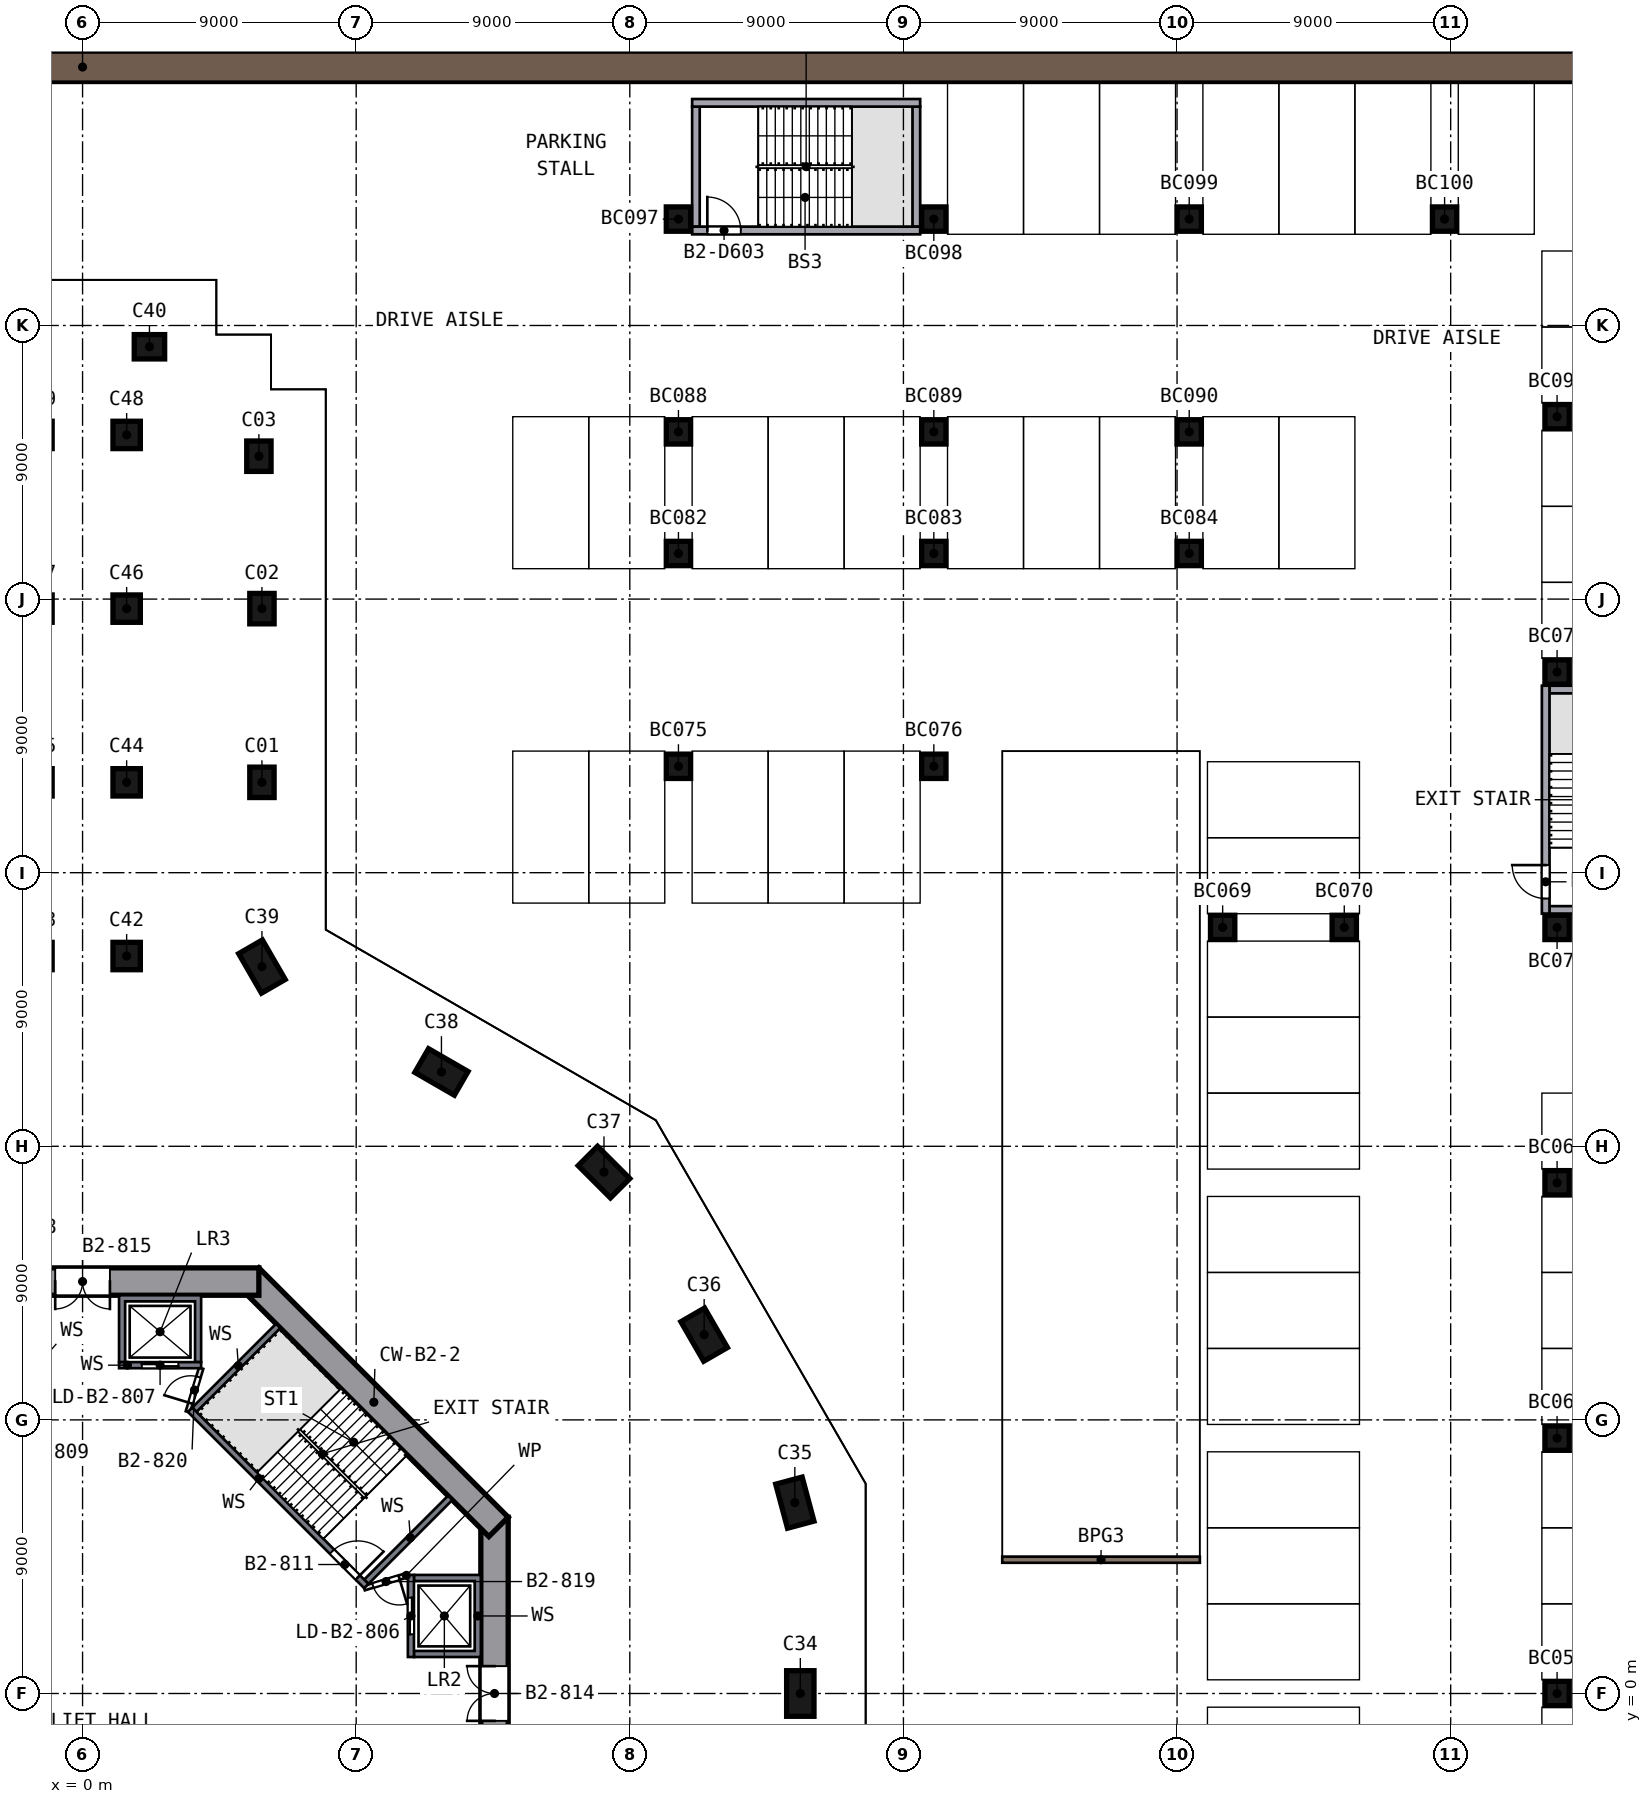
"""IFC4 building model, lengths in metres.
Left out: names, types, materials, properties, quantities, classifications, styles, units other than length and angle.
Written with IfcOpenShell. Run it as: python <this file> out.ifc"""

import sys

from ifc_helpers import new_model, si_unit, direction, frame, frame_2d, origin, origin_2d, place, context, subcontext, project, spatial, polyline, rectangle, outline, extrude, element, fill, save


model = new_model("IFC4")
c1 = context("Model", 3, precision=1e-05, world=origin(), true_north=direction((0.0, 1.0)))
c2 = subcontext(c1, "Body", "Model", "MODEL_VIEW")
j1 = project(units=[si_unit("LENGTHUNIT", "METRE"), si_unit("PLANEANGLEUNIT", "RADIAN")], contexts=[c1])
p1 = place(None, origin())
s1 = spatial("IfcSite", under=j1, at=p1, CompositionType="ELEMENT")
p2 = place(p1, origin())
s2 = spatial("IfcBuilding", under=s1, at=p2, CompositionType="ELEMENT")
p3 = place(p2, frame((0.0, 0.0, -7.8)))
s3 = spatial("IfcBuildingStorey", under=s2, at=p3, CompositionType="ELEMENT", Elevation=-7.8)
for number, where, z_axis, x_axis in (
    (1, (5.9, 29.972, 0.0), (0.0, 0.0, 1.0), (0.0, 1.0, 0.0)),
    (2, (5.9, 35.686, 0.0), (0.0, 0.0, 1.0), (0.0, 1.0, 0.0)),
    (3, (5.8, 40.7, 0.0), (0.0, 0.0, 1.0), (0.0, 1.0, 0.0)),
):
    element("IfcColumn", number, at=place(p3, frame(where, z_axis=z_axis, x_axis=x_axis)), inside=s3, PredefinedType="COLUMN", context=c2, shape_type="SweptSolid", body=[
        extrude(rectangle(XDim=1.0, YDim=0.8, at=origin_2d()), origin(), (0.0, 0.0, 1.0), 3.45),
    ])
for number, where, z_axis, x_axis in (
    (4, (23.608, 0.0, 0.0), (0.0, 0.0, 1.0), (0.0, 1.0, 0.0)),
    (5, (23.428, 6.278, 0.0), (0.0, 0.0, 1.0), (0.259, -0.966, 0.0)),
    (6, (20.445, 11.804, 0.0), (0.0, 0.0, 1.0), (-0.5, 0.866, 0.0)),
    (7, (17.151, 17.151, 0.0), (0.0, 0.0, 1.0), (0.707, -0.707, 0.0)),
    (8, (11.804, 20.445, 0.0), (0.0, 0.0, 1.0), (-0.866, 0.5, 0.0)),
    (9, (5.9, 23.912, 0.0), (0.0, 0.0, 1.0), (0.5, -0.866, 0.0)),
):
    element("IfcColumn", number, at=place(p3, frame(where, z_axis=z_axis, x_axis=x_axis)), inside=s3, PredefinedType="COLUMN", context=c2, shape_type="SweptSolid", body=[
        extrude(rectangle(XDim=1.5, YDim=0.9, at=origin_2d()), origin(), (0.0, 0.0, 1.0), 3.45),
    ])
p4 = place(p3, frame((2.2, 44.3, 0.0), z_axis=(0.0, 0.0, 1.0), x_axis=(-1.0, 0.0, 0.0)))
e10 = element("IfcColumn", 10, at=p4, inside=s3, PredefinedType="COLUMN", context=c2, shape_type="SweptSolid", body=[
    extrude(rectangle(XDim=1.0, YDim=0.8, at=origin_2d()), origin(), (0.0, 0.0, 1.0), 3.45),
])
for number, where, z_axis, x_axis in (
    (11, (1.45, 24.258, 0.0), (0.0, 0.0, 1.0), (0.0, 1.0, 0.0)),
    (12, (1.45, 29.972, 0.0), (0.0, 0.0, 1.0), (0.0, 1.0, 0.0)),
    (13, (1.45, 35.686, 0.0), (0.0, 0.0, 1.0), (0.0, 1.0, 0.0)),
    (14, (1.45, 41.4, 0.0), (0.0, 0.0, 1.0), (0.0, 1.0, 0.0)),
):
    element("IfcColumn", number, at=place(p3, frame(where, z_axis=z_axis, x_axis=x_axis)), inside=s3, PredefinedType="COLUMN", context=c2, shape_type="SweptSolid", body=[
        extrude(rectangle(XDim=0.9, YDim=0.9, at=origin_2d()), origin(), (0.0, 0.0, 1.0), 3.45),
    ])
p5 = place(p3, frame((13.55, -5.799, 0.0), z_axis=(0.0, 0.0, 1.0), x_axis=(0.0, 1.0, 0.0)))
e15 = element("IfcWall", 15, at=p5, inside=s3, PredefinedType="SHEAR", context=c2, shape_type="SweptSolid", body=[
    extrude(rectangle(XDim=11.598, YDim=0.9, at=frame_2d((5.799, 0.0))), origin(), (0.0, 0.0, 1.0), 3.9),
])
p6 = place(p5, frame((4.899, 0.0, 0.0)))
e16 = element("IfcOpeningElement", 16, at=p6, cuts=e15, PredefinedType="OPENING", context=c2, shape_type="SweptSolid", body=[
    extrude(rectangle(XDim=1.8, YDim=2.1, at=frame_2d((0.9, 1.05))), frame((0.0, 0.46, 0.0), z_axis=(0.0, -1.0, 0.0), x_axis=(1.0, 0.0, 0.0)), (0.0, 0.0, 1.0), 0.92),
])
p7 = place(p3, frame((13.682, 5.481, 0.0), z_axis=(0.0, 0.0, 1.0), x_axis=(-0.707106781, 0.707106781, 0.0)))
e17 = element("IfcWall", 17, at=p7, inside=s3, PredefinedType="SHEAR", context=c2, shape_type="SweptSolid", body=[
    extrude(rectangle(XDim=11.598, YDim=0.9, at=frame_2d((5.799, 0.0))), origin(), (0.0, 0.0, 1.0), 3.9),
])
p8 = place(p3, frame((5.799, 13.55, 0.0), z_axis=(0.0, 0.0, 1.0), x_axis=(-1.0, 0.0, 0.0)))
e18 = element("IfcWall", 18, at=p8, inside=s3, PredefinedType="SHEAR", context=c2, shape_type="SweptSolid", body=[
    extrude(rectangle(XDim=11.598, YDim=0.9, at=frame_2d((5.799, 0.0))), origin(), (0.0, 0.0, 1.0), 3.9),
])
p9 = place(p8, frame((4.899, 0.0, 0.0)))
e19 = element("IfcOpeningElement", 19, at=p9, cuts=e18, PredefinedType="OPENING", context=c2, shape_type="SweptSolid", body=[
    extrude(rectangle(XDim=1.8, YDim=2.1, at=frame_2d((0.9, 1.05))), frame((0.0, 0.46, 0.0), z_axis=(0.0, -1.0, 0.0), x_axis=(1.0, 0.0, 0.0)), (0.0, 0.0, 1.0), 0.92),
])
p10 = place(p3, origin())
e20 = element("IfcWall", 20, at=p10, inside=s3, PredefinedType="SOLIDWALL", context=c2, shape_type="SweptSolid", body=[
    extrude(outline(polyline([(54.0, 54.0), (-54.0, 54.0), (-53.0, 53.0), (53.0, 53.0), (54.0, 54.0)])), origin(), (0.0, 0.0, 1.0), 3.9),
])
for number, where, z_axis, x_axis in (
    (21, (48.5, 0.0, 0.0), (0.0, 0.0, 1.0), (1.0, 0.0, 0.0)),
    (22, (48.5, 8.4, 0.0), (0.0, 0.0, 1.0), (1.0, 0.0, 0.0)),
    (23, (48.5, 16.8, 0.0), (0.0, 0.0, 1.0), (1.0, 0.0, 0.0)),
    (24, (37.5, 25.2, 0.0), (0.0, 0.0, 1.0), (1.0, 0.0, 0.0)),
    (25, (41.5, 25.2, 0.0), (0.0, 0.0, 1.0), (1.0, 0.0, 0.0)),
    (26, (48.5, 25.2, 0.0), (0.0, 0.0, 1.0), (1.0, 0.0, 0.0)),
    (27, (19.6, 30.5, 0.0), (0.0, 0.0, 1.0), (1.0, 0.0, 0.0)),
    (28, (28.0, 30.5, 0.0), (0.0, 0.0, 1.0), (1.0, 0.0, 0.0)),
    (29, (48.5, 33.6, 0.0), (0.0, 0.0, 1.0), (1.0, 0.0, 0.0)),
    (30, (19.6, 37.5, 0.0), (0.0, 0.0, 1.0), (1.0, 0.0, 0.0)),
    (31, (28.0, 37.5, 0.0), (0.0, 0.0, 1.0), (1.0, 0.0, 0.0)),
    (32, (36.4, 37.5, 0.0), (0.0, 0.0, 1.0), (1.0, 0.0, 0.0)),
    (33, (19.6, 41.5, 0.0), (0.0, 0.0, 1.0), (1.0, 0.0, 0.0)),
    (34, (28.0, 41.5, 0.0), (0.0, 0.0, 1.0), (1.0, 0.0, 0.0)),
    (35, (36.4, 41.5, 0.0), (0.0, 0.0, 1.0), (1.0, 0.0, 0.0)),
    (36, (48.5, 42.0, 0.0), (0.0, 0.0, 1.0), (1.0, 0.0, 0.0)),
    (37, (19.6, 48.5, 0.0), (0.0, 0.0, 1.0), (1.0, 0.0, 0.0)),
    (38, (28.0, 48.5, 0.0), (0.0, 0.0, 1.0), (1.0, 0.0, 0.0)),
    (39, (36.4, 48.5, 0.0), (0.0, 0.0, 1.0), (1.0, 0.0, 0.0)),
    (40, (44.8, 48.5, 0.0), (0.0, 0.0, 1.0), (1.0, 0.0, 0.0)),
):
    element("IfcColumn", number, at=place(p3, frame(where, z_axis=z_axis, x_axis=x_axis)), inside=s3, PredefinedType="COLUMN", context=c2, shape_type="SweptSolid", body=[
        extrude(rectangle(XDim=0.8, YDim=0.8, at=origin_2d()), origin(), (0.0, 0.0, 1.0), 3.9),
    ])
p11 = place(p3, frame((36.75, 4.4, 0.0), z_axis=(0.0, 0.0, 1.0), x_axis=(-1.0, 0.0, 0.0)))
e41 = element("IfcWall", 41, at=p11, inside=s3, PredefinedType="PARAPET", context=c2, shape_type="SweptSolid", body=[
    extrude(rectangle(XDim=6.5, YDim=0.2, at=frame_2d((3.25, 0.0))), origin(), (0.0, 0.0, 1.0), 1.12),
])
p12 = place(p3, origin())
e42 = element("IfcWall", 42, at=p12, inside=s3, PredefinedType="SOLIDWALL", context=c2, shape_type="SweptSolid", body=[
    extrude(outline(polyline([(13.1, 3.9), (13.1, 1.2), (10.9, 1.2), (10.9, 1.4), (12.9, 1.4), (12.9, 3.7), (10.9, 3.7), (10.9, 3.9), (13.1, 3.9)])), origin(), (0.0, 0.0, 1.0), 3.45),
])
p13 = place(p3, frame((10.8, 1.2, 0.0), z_axis=(0.0, 0.0, 1.0), x_axis=(0.0, 1.0, 0.0)))
e43 = element("IfcWall", 43, at=p13, inside=s3, PredefinedType="SOLIDWALL", context=c2, shape_type="SweptSolid", body=[
    extrude(rectangle(XDim=2.7, YDim=0.2, at=frame_2d((1.35, 0.0))), origin(), (0.0, 0.0, 1.0), 3.45),
])
p14 = place(p13, frame((0.75, 0.0, 0.0)))
e44 = element("IfcOpeningElement", 44, at=p14, cuts=e43, PredefinedType="OPENING", context=c2, shape_type="SweptSolid", body=[
    extrude(rectangle(XDim=1.2, YDim=2.1, at=frame_2d((0.6, 1.05))), frame((0.0, 0.11, 0.0), z_axis=(0.0, -1.0, 0.0), x_axis=(1.0, 0.0, 0.0)), (0.0, 0.0, 1.0), 0.22),
])
p15 = place(p3, origin())
e45 = element("IfcWall", 45, at=p15, inside=s3, PredefinedType="SOLIDWALL", context=c2, shape_type="SweptSolid", body=[
    extrude(outline(polyline([(3.9, 13.1), (3.9, 10.9), (3.7, 10.9), (3.7, 12.9), (1.4, 12.9), (1.4, 10.9), (1.2, 10.9), (1.2, 13.1), (3.9, 13.1)])), origin(), (0.0, 0.0, 1.0), 3.45),
])
p16 = place(p3, frame((1.2, 10.8, 0.0), z_axis=(0.0, 0.0, 1.0), x_axis=(1.0, 0.0, 0.0)))
e46 = element("IfcWall", 46, at=p16, inside=s3, PredefinedType="SOLIDWALL", context=c2, shape_type="SweptSolid", body=[
    extrude(rectangle(XDim=2.7, YDim=0.2, at=frame_2d((1.35, 0.0))), origin(), (0.0, 0.0, 1.0), 3.45),
])
p17 = place(p16, frame((0.75, 0.0, 0.0)))
e47 = element("IfcOpeningElement", 47, at=p17, cuts=e46, PredefinedType="OPENING", context=c2, shape_type="SweptSolid", body=[
    extrude(rectangle(XDim=1.2, YDim=2.1, at=frame_2d((0.6, 1.05))), frame((0.0, 0.11, 0.0), z_axis=(0.0, -1.0, 0.0), x_axis=(1.0, 0.0, 0.0)), (0.0, 0.0, 1.0), 0.22),
])
p18 = place(p3, frame((3.535, 9.334, 0.0), z_axis=(0.0, 0.0, 1.0), x_axis=(0.707106781, -0.707106781, 0.0)))
e48 = element("IfcWall", 48, at=p18, inside=s3, PredefinedType="SOLIDWALL", context=c2, shape_type="SweptSolid", body=[
    extrude(rectangle(XDim=8.2, YDim=0.2, at=frame_2d((4.1, 0.0))), origin(), (0.0, 0.0, 1.0), 3.45),
])
p19 = place(p18, frame((6.6, 0.0, 0.0)))
e49 = element("IfcOpeningElement", 49, at=p19, cuts=e48, PredefinedType="OPENING", context=c2, shape_type="SweptSolid", body=[
    extrude(rectangle(XDim=1.2, YDim=2.1, at=frame_2d((0.6, 1.05))), frame((0.0, 0.11, 0.0), z_axis=(0.0, -1.0, 0.0), x_axis=(1.0, 0.0, 0.0)), (0.0, 0.0, 1.0), 0.22),
])
for number, where, z_axis, x_axis in (
    (50, (9.334, 3.677, 0.0), (0.0, 0.0, 1.0), (0.707, 0.707, 0.0)),
    (51, (3.677, 9.334, 0.0), (0.0, 0.0, 1.0), (0.707, 0.707, 0.0)),
):
    element("IfcWall", number, at=place(p3, frame(where, z_axis=z_axis, x_axis=x_axis)), inside=s3, PredefinedType="SOLIDWALL", context=c2, shape_type="SweptSolid", body=[
        extrude(rectangle(XDim=3.9, YDim=0.2, at=frame_2d((1.95, 0.0))), origin(), (0.0, 0.0, 1.0), 3.45),
    ])
p20 = place(p3, frame((10.7, 3.9, 0.0), z_axis=(0.0, 0.0, 1.0), x_axis=(-0.957084567, -0.289808785, 0.0)))
e52 = element("IfcWall", 52, at=p20, inside=s3, PredefinedType="PARTITIONING", context=c2, shape_type="SweptSolid", body=[
    extrude(rectangle(XDim=1.501, YDim=0.15, at=frame_2d((0.75, 0.0))), origin(), (0.0, 0.0, 1.0), 3.45),
])
p21 = place(p20, frame((0.301, 0.0, 0.0)))
e53 = element("IfcOpeningElement", 53, at=p21, cuts=e52, PredefinedType="OPENING", context=c2, shape_type="SweptSolid", body=[
    extrude(rectangle(XDim=0.9, YDim=2.1, at=frame_2d((0.45, 1.05))), frame((0.0, 0.085, 0.0), z_axis=(0.0, -1.0, 0.0), x_axis=(1.0, 0.0, 0.0)), (0.0, 0.0, 1.0), 0.17),
])
p22 = place(p3, frame((3.465, 9.263, 0.0), z_axis=(0.0, 0.0, 1.0), x_axis=(0.289808785, 0.957084567, 0.0)))
e54 = element("IfcWall", 54, at=p22, inside=s3, PredefinedType="PARTITIONING", context=c2, shape_type="SweptSolid", body=[
    extrude(rectangle(XDim=1.501, YDim=0.15, at=frame_2d((0.75, 0.0))), origin(), (0.0, 0.0, 1.0), 3.45),
])
p23 = place(p22, frame((0.301, 0.0, 0.0)))
e55 = element("IfcOpeningElement", 55, at=p23, cuts=e54, PredefinedType="OPENING", context=c2, shape_type="SweptSolid", body=[
    extrude(rectangle(XDim=0.9, YDim=2.1, at=frame_2d((0.45, 1.05))), frame((0.0, 0.085, 0.0), z_axis=(0.0, -1.0, 0.0), x_axis=(1.0, 0.0, 0.0)), (0.0, 0.0, 1.0), 0.17),
])
p24 = place(p3, frame((20.05, 52.325, 0.0), z_axis=(0.0, 0.0, 1.0), x_axis=(1.0, 0.0, 0.0)))
e56 = element("IfcWall", 56, at=p24, inside=s3, PredefinedType="SOLIDWALL", context=c2, shape_type="SweptSolid", body=[
    extrude(rectangle(XDim=7.5, YDim=0.25, at=frame_2d((3.75, 0.0))), origin(), (0.0, 0.0, 1.0), 3.9),
])
p25 = place(p3, frame((20.05, 48.125, 0.0), z_axis=(0.0, 0.0, 1.0), x_axis=(1.0, 0.0, 0.0)))
e57 = element("IfcWall", 57, at=p25, inside=s3, PredefinedType="SOLIDWALL", context=c2, shape_type="SweptSolid", body=[
    extrude(rectangle(XDim=7.5, YDim=0.25, at=frame_2d((3.75, 0.0))), origin(), (0.0, 0.0, 1.0), 3.9),
])
p26 = place(p25, frame((0.5, 0.0, 0.0)))
e58 = element("IfcOpeningElement", 58, at=p26, cuts=e57, PredefinedType="OPENING", context=c2, shape_type="SweptSolid", body=[
    extrude(rectangle(XDim=1.1, YDim=2.1, at=frame_2d((0.55, 1.05))), frame((0.0, 0.135, 0.0), z_axis=(0.0, -1.0, 0.0), x_axis=(1.0, 0.0, 0.0)), (0.0, 0.0, 1.0), 0.27),
])
for number, where, z_axis, x_axis in (
    (59, (20.175, 48.25, 0.0), (0.0, 0.0, 1.0), (0.0, 1.0, 0.0)),
    (60, (27.425, 48.25, 0.0), (0.0, 0.0, 1.0), (0.0, 1.0, 0.0)),
):
    element("IfcWall", number, at=place(p3, frame(where, z_axis=z_axis, x_axis=x_axis)), inside=s3, PredefinedType="SOLIDWALL", context=c2, shape_type="SweptSolid", body=[
        extrude(rectangle(XDim=3.95, YDim=0.25, at=frame_2d((1.975, 0.0))), origin(), (0.0, 0.0, 1.0), 3.9),
    ])
p27 = place(p3, frame((48.125, 25.65, 0.0), z_axis=(0.0, 0.0, 1.0), x_axis=(0.0, 1.0, 0.0)))
e61 = element("IfcWall", 61, at=p27, inside=s3, PredefinedType="SOLIDWALL", context=c2, shape_type="SweptSolid", body=[
    extrude(rectangle(XDim=7.5, YDim=0.25, at=frame_2d((3.75, 0.0))), origin(), (0.0, 0.0, 1.0), 3.9),
])
p28 = place(p27, frame((0.5, 0.0, 0.0)))
e62 = element("IfcOpeningElement", 62, at=p28, cuts=e61, PredefinedType="OPENING", context=c2, shape_type="SweptSolid", body=[
    extrude(rectangle(XDim=1.1, YDim=2.1, at=frame_2d((0.55, 1.05))), frame((0.0, 0.135, 0.0), z_axis=(0.0, -1.0, 0.0), x_axis=(1.0, 0.0, 0.0)), (0.0, 0.0, 1.0), 0.27),
])
for number, where, z_axis, x_axis in (
    (63, (52.2, 25.775, 0.0), (0.0, 0.0, 1.0), (-1.0, 0.0, 0.0)),
    (64, (52.2, 33.025, 0.0), (0.0, 0.0, 1.0), (-1.0, 0.0, 0.0)),
):
    element("IfcWall", number, at=place(p3, frame(where, z_axis=z_axis, x_axis=x_axis)), inside=s3, PredefinedType="SOLIDWALL", context=c2, shape_type="SweptSolid", body=[
        extrude(rectangle(XDim=3.95, YDim=0.25, at=frame_2d((1.975, 0.0))), origin(), (0.0, 0.0, 1.0), 3.9),
    ])
p29 = place(p14, origin())
e65 = element("IfcDoor", 65, at=p29, inside=s3, OperationType="DOUBLE_DOOR_SLIDING", PredefinedType="DOOR", context=c2, shape_type="SweptSolid", body=[
    extrude(rectangle(XDim=1.2, YDim=2.1, at=frame_2d((0.6, 1.05))), frame((0.0, 0.025, 0.0), z_axis=(0.0, -1.0, 0.0), x_axis=(1.0, 0.0, 0.0)), (0.0, 0.0, 1.0), 0.05),
])
fill(e44, e65)
p30 = place(p17, origin())
e66 = element("IfcDoor", 66, at=p30, inside=s3, OperationType="DOUBLE_DOOR_SLIDING", PredefinedType="DOOR", context=c2, shape_type="SweptSolid", body=[
    extrude(rectangle(XDim=1.2, YDim=2.1, at=frame_2d((0.6, 1.05))), frame((0.0, 0.025, 0.0), z_axis=(0.0, -1.0, 0.0), x_axis=(1.0, 0.0, 0.0)), (0.0, 0.0, 1.0), 0.05),
])
fill(e47, e66)
p31 = place(p19, origin())
e67 = element("IfcDoor", 67, at=p31, inside=s3, OperationType="SINGLE_SWING_RIGHT", PredefinedType="DOOR", context=c2, shape_type="SweptSolid", body=[
    extrude(rectangle(XDim=1.2, YDim=2.1, at=frame_2d((0.6, 1.05))), frame((0.0, 0.025, 0.0), z_axis=(0.0, -1.0, 0.0), x_axis=(1.0, 0.0, 0.0)), (0.0, 0.0, 1.0), 0.05),
])
fill(e49, e67)
p32 = place(p6, origin())
e68 = element("IfcDoor", 68, at=p32, inside=s3, OperationType="DOUBLE_DOOR_SINGLE_SWING", PredefinedType="DOOR", context=c2, shape_type="SweptSolid", body=[
    extrude(rectangle(XDim=1.8, YDim=2.1, at=frame_2d((0.9, 1.05))), frame((0.0, 0.025, 0.0), z_axis=(0.0, -1.0, 0.0), x_axis=(1.0, 0.0, 0.0)), (0.0, 0.0, 1.0), 0.05),
])
fill(e16, e68)
p33 = place(p9, origin())
e69 = element("IfcDoor", 69, at=p33, inside=s3, OperationType="DOUBLE_DOOR_SINGLE_SWING", PredefinedType="DOOR", context=c2, shape_type="SweptSolid", body=[
    extrude(rectangle(XDim=1.8, YDim=2.1, at=frame_2d((0.9, 1.05))), frame((0.0, 0.025, 0.0), z_axis=(0.0, -1.0, 0.0), x_axis=(1.0, 0.0, 0.0)), (0.0, 0.0, 1.0), 0.05),
])
fill(e19, e69)
p34 = place(p21, origin())
e70 = element("IfcDoor", 70, at=p34, inside=s3, OperationType="SINGLE_SWING_LEFT", PredefinedType="DOOR", context=c2, shape_type="SweptSolid", body=[
    extrude(rectangle(XDim=0.9, YDim=2.1, at=frame_2d((0.45, 1.05))), frame((0.0, 0.025, 0.0), z_axis=(0.0, -1.0, 0.0), x_axis=(1.0, 0.0, 0.0)), (0.0, 0.0, 1.0), 0.05),
])
fill(e53, e70)
p35 = place(p23, origin())
e71 = element("IfcDoor", 71, at=p35, inside=s3, OperationType="SINGLE_SWING_LEFT", PredefinedType="DOOR", context=c2, shape_type="SweptSolid", body=[
    extrude(rectangle(XDim=0.9, YDim=2.1, at=frame_2d((0.45, 1.05))), frame((0.0, 0.025, 0.0), z_axis=(0.0, -1.0, 0.0), x_axis=(1.0, 0.0, 0.0)), (0.0, 0.0, 1.0), 0.05),
])
fill(e55, e71)
p36 = place(p26, origin())
e72 = element("IfcDoor", 72, at=p36, inside=s3, OperationType="SINGLE_SWING_LEFT", PredefinedType="DOOR", context=c2, shape_type="SweptSolid", body=[
    extrude(rectangle(XDim=1.1, YDim=2.1, at=frame_2d((0.55, 1.05))), frame((0.0, 0.025, 0.0), z_axis=(0.0, -1.0, 0.0), x_axis=(1.0, 0.0, 0.0)), (0.0, 0.0, 1.0), 0.05),
])
fill(e58, e72)
p37 = place(p28, origin())
e73 = element("IfcDoor", 73, at=p37, inside=s3, OperationType="SINGLE_SWING_RIGHT", PredefinedType="DOOR", context=c2, shape_type="SweptSolid", body=[
    extrude(rectangle(XDim=1.1, YDim=2.1, at=frame_2d((0.55, 1.05))), frame((0.0, 0.025, 0.0), z_axis=(0.0, -1.0, 0.0), x_axis=(1.0, 0.0, 0.0)), (0.0, 0.0, 1.0), 0.05),
])
fill(e62, e73)
save(model, sys.argv[1])
